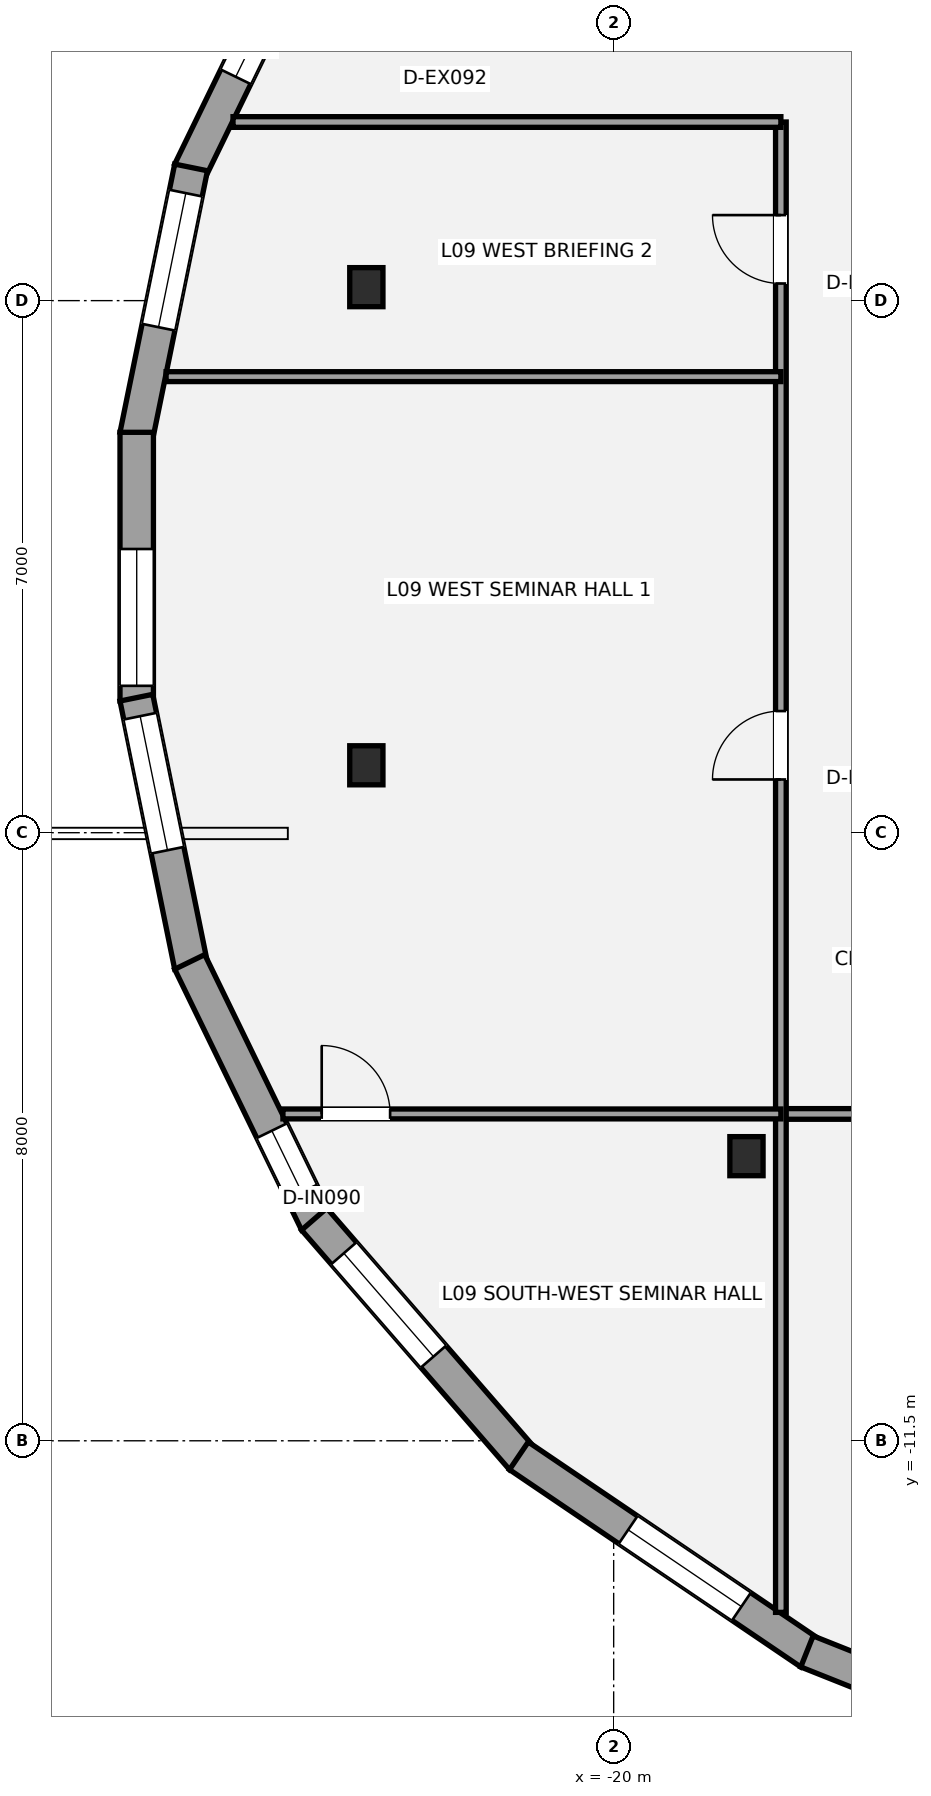
"""IFC4 building model, lengths in metres.
Left out: names, types, materials, properties, quantities, classifications, styles, units other than length and angle.
Written with IfcOpenShell. Run it as: python <this file> out.ifc"""

import sys

from ifc_helpers import new_model, si_unit, direction, frame, frame_2d, origin, origin_2d, place, context, subcontext, project, spatial, rectangle, i_section, extrude, element, fill, save


model = new_model("IFC4")
c1 = context("Model", 3, precision=1e-05, world=origin(), true_north=direction((0.0, 1.0)))
c2 = subcontext(c1, "Body", "Model", "MODEL_VIEW")
j1 = project(units=[si_unit("LENGTHUNIT", "METRE"), si_unit("PLANEANGLEUNIT", "RADIAN")], contexts=[c1])
p1 = place(None, origin())
s1 = spatial("IfcSite", under=j1, at=p1, CompositionType="ELEMENT")
p2 = place(p1, origin())
s2 = spatial("IfcBuilding", under=s1, at=p2, CompositionType="ELEMENT")
p3 = place(p2, frame((0.0, 0.0, 37.8)))
s3 = spatial("IfcBuildingStorey", under=s2, at=p3, CompositionType="ELEMENT", Elevation=37.8)
for number, where, z_axis, x_axis in (
    (1, (-23.254, 3.677, 0.0), (0.0, 0.0, 1.0), (1.0, 0.0, 0.0)),
    (2, (-23.254, -2.613, 0.0), (0.0, 0.0, 1.0), (1.0, 0.0, 0.0)),
    (3, (-18.253, -7.756, 0.0), (0.0, 0.0, 1.0), (1.0, 0.0, 0.0)),
):
    element("IfcColumn", number, at=place(p3, frame(where, z_axis=z_axis, x_axis=x_axis)), inside=s3, PredefinedType="COLUMN", context=c2, shape_type="SweptSolid", body=[
        extrude(i_section(OverallWidth=0.437, OverallDepth=0.514, WebThickness=0.061, FlangeThickness=0.097, at=origin_2d()), origin(), (0.0, 0.0, 1.0), 3.6),
    ])
p4 = place(p3, frame((-25.578, 5.2, 0.0), z_axis=(0.0, 0.0, 1.0), x_axis=(0.437488090563, 0.899224204865, 0.0)))
e4 = element("IfcWall", 4, at=p4, inside=s3, PredefinedType="STANDARD", context=c2, shape_type="SweptSolid", body=[
    extrude(rectangle(XDim=3.816, YDim=0.44, at=frame_2d((1.908, 0.0))), origin(), (0.0, 0.0, 1.0), 2.533),
])
p5 = place(p4, frame((1.384, 0.0, 0.58)))
e5 = element("IfcOpeningElement", 5, at=p5, cuts=e4, PredefinedType="OPENING", context=c2, shape_type="SweptSolid", body=[
    extrude(rectangle(XDim=0.9, YDim=1.35, at=frame_2d((0.45, 0.675))), frame((0.0, 0.23, 0.0), z_axis=(0.0, -1.0, 0.0), x_axis=(1.0, 0.0, 0.0)), (0.0, 0.0, 1.0), 0.46),
])
p6 = place(p3, frame((-26.28, 1.724, 0.0), z_axis=(0.0, 0.0, 1.0), x_axis=(0.199856409009, 0.979825196542, 0.0)))
e6 = element("IfcWall", 6, at=p6, inside=s3, PredefinedType="STANDARD", context=c2, shape_type="SweptSolid", body=[
    extrude(rectangle(XDim=3.601, YDim=0.44, at=frame_2d((1.801, 0.0))), origin(), (0.0, 0.0, 1.0), 2.533),
])
p7 = place(p6, frame((1.456, 0.0, 0.65)))
e7 = element("IfcOpeningElement", 7, at=p7, cuts=e6, PredefinedType="OPENING", context=c2, shape_type="SweptSolid", body=[
    extrude(rectangle(XDim=1.8, YDim=1.7, at=frame_2d((0.9, 0.85))), frame((0.0, 0.23, 0.0), z_axis=(0.0, -1.0, 0.0), x_axis=(1.0, 0.0, 0.0)), (0.0, 0.0, 1.0), 0.46),
])
p8 = place(p3, frame((-26.275, -1.768, 0.0), z_axis=(0.0, 0.0, 1.0), x_axis=(0.0, 1.0, 0.0)))
e8 = element("IfcWall", 8, at=p8, inside=s3, PredefinedType="STANDARD", context=c2, shape_type="SweptSolid", body=[
    extrude(rectangle(XDim=3.535, YDim=0.44, at=frame_2d((1.768, 0.0))), origin(), (0.0, 0.0, 1.0), 2.533),
])
p9 = place(p8, frame((0.2, 0.0, 0.65)))
e9 = element("IfcOpeningElement", 9, at=p9, cuts=e8, PredefinedType="OPENING", context=c2, shape_type="SweptSolid", body=[
    extrude(rectangle(XDim=1.8, YDim=1.7, at=frame_2d((0.9, 0.85))), frame((0.0, 0.23, 0.0), z_axis=(0.0, -1.0, 0.0), x_axis=(1.0, 0.0, 0.0)), (0.0, 0.0, 1.0), 0.46),
])
p10 = place(p3, frame((-25.56, -5.252, 0.0), z_axis=(0.0, 0.0, 1.0), x_axis=(-0.199856409009, 0.979825196542, 0.0)))
e10 = element("IfcWall", 10, at=p10, inside=s3, PredefinedType="STANDARD", context=c2, shape_type="SweptSolid", body=[
    extrude(rectangle(XDim=3.601, YDim=0.44, at=frame_2d((1.801, 0.0))), origin(), (0.0, 0.0, 1.0), 2.533),
])
p11 = place(p10, frame((1.553, 0.0, 0.65)))
e11 = element("IfcOpeningElement", 11, at=p11, cuts=e10, PredefinedType="OPENING", context=c2, shape_type="SweptSolid", body=[
    extrude(rectangle(XDim=1.8, YDim=1.7, at=frame_2d((0.9, 0.85))), frame((0.0, 0.23, 0.0), z_axis=(0.0, -1.0, 0.0), x_axis=(1.0, 0.0, 0.0)), (0.0, 0.0, 1.0), 0.46),
])
p12 = place(p3, frame((-23.908, -8.632, 0.0), z_axis=(0.0, 0.0, 1.0), x_axis=(-0.437488090563, 0.899224204865, 0.0)))
e12 = element("IfcWall", 12, at=p12, inside=s3, PredefinedType="STANDARD", context=c2, shape_type="SweptSolid", body=[
    extrude(rectangle(XDim=3.816, YDim=0.44, at=frame_2d((1.908, 0.0))), origin(), (0.0, 0.0, 1.0), 2.533),
])
p13 = place(p12, frame((0.447, 0.0, 0.58)))
e13 = element("IfcOpeningElement", 13, at=p13, cuts=e12, PredefinedType="OPENING", context=c2, shape_type="SweptSolid", body=[
    extrude(rectangle(XDim=0.9, YDim=1.35, at=frame_2d((0.45, 0.675))), frame((0.0, 0.23, 0.0), z_axis=(0.0, -1.0, 0.0), x_axis=(1.0, 0.0, 0.0)), (0.0, 0.0, 1.0), 0.46),
])
p14 = place(p3, frame((-21.204, -11.736, 0.0), z_axis=(0.0, 0.0, 1.0), x_axis=(-0.655509370307, 0.755187040037, 0.0)))
e14 = element("IfcWall", 14, at=p14, inside=s3, PredefinedType="STANDARD", context=c2, shape_type="SweptSolid", body=[
    extrude(rectangle(XDim=4.174, YDim=0.44, at=frame_2d((2.087, 0.0))), origin(), (0.0, 0.0, 1.0), 2.533),
])
p15 = place(p14, frame((1.779, 0.0, 0.65)))
e15 = element("IfcOpeningElement", 15, at=p15, cuts=e14, PredefinedType="OPENING", context=c2, shape_type="SweptSolid", body=[
    extrude(rectangle(XDim=1.8, YDim=1.7, at=frame_2d((0.9, 0.85))), frame((0.0, 0.23, 0.0), z_axis=(0.0, -1.0, 0.0), x_axis=(1.0, 0.0, 0.0)), (0.0, 0.0, 1.0), 0.46),
])
p16 = place(p3, frame((-17.415, -14.294, 0.0), z_axis=(0.0, 0.0, 1.0), x_axis=(-0.827913159939, 0.560856309227, 0.0)))
e16 = element("IfcWall", 16, at=p16, inside=s3, PredefinedType="STANDARD", context=c2, shape_type="SweptSolid", body=[
    extrude(rectangle(XDim=4.629, YDim=0.44, at=frame_2d((2.314, 0.0))), origin(), (0.0, 0.0, 1.0), 2.533),
])
p17 = place(p16, frame((1.092, 0.0, 0.65)))
e17 = element("IfcOpeningElement", 17, at=p17, cuts=e16, PredefinedType="OPENING", context=c2, shape_type="SweptSolid", body=[
    extrude(rectangle(XDim=1.8, YDim=1.7, at=frame_2d((0.9, 0.85))), frame((0.0, 0.23, 0.0), z_axis=(0.0, -1.0, 0.0), x_axis=(1.0, 0.0, 0.0)), (0.0, 0.0, 1.0), 0.46),
])
p18 = place(p3, frame((-12.804, -16.125, 0.0), z_axis=(0.0, 0.0, 1.0), x_axis=(-0.929030310441, 0.370003624688, 0.0)))
e18 = element("IfcWall", 18, at=p18, inside=s3, PredefinedType="STANDARD", context=c2, shape_type="SweptSolid", body=[
    extrude(rectangle(XDim=5.009, YDim=0.44, at=frame_2d((2.504, 0.0))), origin(), (0.0, 0.0, 1.0), 2.533),
])
p19 = place(p18, frame((2.023, 0.0, 0.65)))
e19 = element("IfcOpeningElement", 19, at=p19, cuts=e18, PredefinedType="OPENING", context=c2, shape_type="SweptSolid", body=[
    extrude(rectangle(XDim=1.8, YDim=1.7, at=frame_2d((0.9, 0.85))), frame((0.0, 0.23, 0.0), z_axis=(0.0, -1.0, 0.0), x_axis=(1.0, 0.0, 0.0)), (0.0, 0.0, 1.0), 0.46),
])
p20 = place(p3, frame((-17.8, -7.2, 0.0), z_axis=(0.0, 0.0, 1.0), x_axis=(1.0, 0.0, 0.0)))
e20 = element("IfcWall", 20, at=p20, inside=s3, PredefinedType="PARTITIONING", context=c2, shape_type="SweptSolid", body=[
    extrude(rectangle(XDim=33.9, YDim=0.14, at=frame_2d((16.95, 0.0))), origin(), (0.0, 0.0, 1.0), 2.853),
])
p21 = place(p20, frame((5.65, 0.0, 0.0)))
e21 = element("IfcOpeningElement", 21, at=p21, cuts=e20, PredefinedType="OPENING", context=c2, shape_type="SweptSolid", body=[
    extrude(rectangle(XDim=1.5, YDim=2.15, at=frame_2d((0.75, 1.075))), frame((0.0, 0.08, 0.0), z_axis=(0.0, -1.0, 0.0), x_axis=(1.0, 0.0, 0.0)), (0.0, 0.0, 1.0), 0.16),
])
p22 = place(p20, frame((17.05, 0.0, 0.0)))
e22 = element("IfcOpeningElement", 22, at=p22, cuts=e20, PredefinedType="OPENING", context=c2, shape_type="SweptSolid", body=[
    extrude(rectangle(XDim=1.5, YDim=2.15, at=frame_2d((0.75, 1.075))), frame((0.0, 0.08, 0.0), z_axis=(0.0, -1.0, 0.0), x_axis=(1.0, 0.0, 0.0)), (0.0, 0.0, 1.0), 0.16),
])
p23 = place(p20, frame((27.6, 0.0, 0.0)))
e23 = element("IfcOpeningElement", 23, at=p23, cuts=e20, PredefinedType="OPENING", context=c2, shape_type="SweptSolid", body=[
    extrude(rectangle(XDim=1.5, YDim=2.15, at=frame_2d((0.75, 1.075))), frame((0.0, 0.08, 0.0), z_axis=(0.0, -1.0, 0.0), x_axis=(1.0, 0.0, 0.0)), (0.0, 0.0, 1.0), 0.16),
])
p24 = place(p3, frame((-17.8, -13.757, 0.0), z_axis=(0.0, 0.0, 1.0), x_axis=(0.0, 1.0, 0.0)))
e24 = element("IfcWall", 24, at=p24, inside=s3, PredefinedType="PARTITIONING", context=c2, shape_type="SweptSolid", body=[
    extrude(rectangle(XDim=19.607, YDim=0.14, at=frame_2d((9.804, 0.0))), origin(), (0.0, 0.0, 1.0), 2.841),
])
p25 = place(p24, frame((10.958, 0.0, 0.0)))
e25 = element("IfcOpeningElement", 25, at=p25, cuts=e24, PredefinedType="OPENING", context=c2, shape_type="SweptSolid", body=[
    extrude(rectangle(XDim=0.9, YDim=2.1, at=frame_2d((0.45, 1.05))), frame((0.0, 0.08, 0.0), z_axis=(0.0, -1.0, 0.0), x_axis=(1.0, 0.0, 0.0)), (0.0, 0.0, 1.0), 0.16),
])
p26 = place(p24, frame((17.483, 0.0, 0.0)))
e26 = element("IfcOpeningElement", 26, at=p26, cuts=e24, PredefinedType="OPENING", context=c2, shape_type="SweptSolid", body=[
    extrude(rectangle(XDim=0.9, YDim=2.1, at=frame_2d((0.45, 1.05))), frame((0.0, 0.08, 0.0), z_axis=(0.0, -1.0, 0.0), x_axis=(1.0, 0.0, 0.0)), (0.0, 0.0, 1.0), 0.16),
])
p27 = place(p3, frame((-25.008, 5.85, 0.0), z_axis=(0.0, 0.0, 1.0), x_axis=(1.0, 0.0, 0.0)))
e27 = element("IfcWall", 27, at=p27, inside=s3, PredefinedType="PARTITIONING", context=c2, shape_type="SweptSolid", body=[
    extrude(rectangle(XDim=7.208, YDim=0.14, at=frame_2d((3.604, 0.0))), origin(), (0.0, 0.0, 1.0), 2.853),
])
p28 = place(p3, frame((-24.351, -7.2, 0.0), z_axis=(0.0, 0.0, 1.0), x_axis=(1.0, 0.0, 0.0)))
e28 = element("IfcWall", 28, at=p28, inside=s3, PredefinedType="PARTITIONING", context=c2, shape_type="SweptSolid", body=[
    extrude(rectangle(XDim=6.551, YDim=0.13, at=frame_2d((3.276, 0.0))), origin(), (0.0, 0.0, 1.0), 2.779),
])
p29 = place(p28, frame((0.51, 0.0, 0.0)))
e29 = element("IfcOpeningElement", 29, at=p29, cuts=e28, PredefinedType="OPENING", context=c2, shape_type="SweptSolid", body=[
    extrude(rectangle(XDim=0.9, YDim=2.1, at=frame_2d((0.45, 1.05))), frame((0.0, 0.075, 0.0), z_axis=(0.0, -1.0, 0.0), x_axis=(1.0, 0.0, 0.0)), (0.0, 0.0, 1.0), 0.15),
])
p30 = place(p3, frame((-25.889, 2.5, 0.0), z_axis=(0.0, 0.0, 1.0), x_axis=(1.0, 0.0, 0.0)))
e30 = element("IfcWall", 30, at=p30, inside=s3, PredefinedType="PARTITIONING", context=c2, shape_type="SweptSolid", body=[
    extrude(rectangle(XDim=8.089, YDim=0.13, at=frame_2d((4.044, 0.0))), origin(), (0.0, 0.0, 1.0), 2.841),
])
p31 = place(p5, origin())
e31 = element("IfcWindow", 31, at=p31, inside=s3, PartitioningType="SINGLE_PANEL", PredefinedType="WINDOW", context=c2, shape_type="SweptSolid", body=[
    extrude(rectangle(XDim=0.9, YDim=1.35, at=frame_2d((0.45, 0.675))), frame((0.0, -0.01, 0.0), z_axis=(0.0, -1.0, 0.0), x_axis=(1.0, 0.0, 0.0)), (0.0, 0.0, 1.0), 0.06),
])
fill(e5, e31)
p32 = place(p7, origin())
e32 = element("IfcWindow", 32, at=p32, inside=s3, PartitioningType="SINGLE_PANEL", PredefinedType="WINDOW", context=c2, shape_type="SweptSolid", body=[
    extrude(rectangle(XDim=1.8, YDim=1.7, at=frame_2d((0.9, 0.85))), frame((0.0, -0.01, 0.0), z_axis=(0.0, -1.0, 0.0), x_axis=(1.0, 0.0, 0.0)), (0.0, 0.0, 1.0), 0.06),
])
fill(e7, e32)
p33 = place(p9, origin())
e33 = element("IfcWindow", 33, at=p33, inside=s3, PartitioningType="SINGLE_PANEL", PredefinedType="WINDOW", context=c2, shape_type="SweptSolid", body=[
    extrude(rectangle(XDim=1.8, YDim=1.7, at=frame_2d((0.9, 0.85))), frame((0.0, -0.01, 0.0), z_axis=(0.0, -1.0, 0.0), x_axis=(1.0, 0.0, 0.0)), (0.0, 0.0, 1.0), 0.06),
])
fill(e9, e33)
p34 = place(p11, origin())
e34 = element("IfcWindow", 34, at=p34, inside=s3, PartitioningType="SINGLE_PANEL", PredefinedType="WINDOW", context=c2, shape_type="SweptSolid", body=[
    extrude(rectangle(XDim=1.8, YDim=1.7, at=frame_2d((0.9, 0.85))), frame((0.0, -0.01, 0.0), z_axis=(0.0, -1.0, 0.0), x_axis=(1.0, 0.0, 0.0)), (0.0, 0.0, 1.0), 0.06),
])
fill(e11, e34)
p35 = place(p13, origin())
e35 = element("IfcWindow", 35, at=p35, inside=s3, PartitioningType="SINGLE_PANEL", PredefinedType="WINDOW", context=c2, shape_type="SweptSolid", body=[
    extrude(rectangle(XDim=0.9, YDim=1.35, at=frame_2d((0.45, 0.675))), frame((0.0, -0.01, 0.0), z_axis=(0.0, -1.0, 0.0), x_axis=(1.0, 0.0, 0.0)), (0.0, 0.0, 1.0), 0.06),
])
fill(e13, e35)
p36 = place(p15, origin())
e36 = element("IfcWindow", 36, at=p36, inside=s3, PartitioningType="SINGLE_PANEL", PredefinedType="WINDOW", context=c2, shape_type="SweptSolid", body=[
    extrude(rectangle(XDim=1.8, YDim=1.7, at=frame_2d((0.9, 0.85))), frame((0.0, -0.01, 0.0), z_axis=(0.0, -1.0, 0.0), x_axis=(1.0, 0.0, 0.0)), (0.0, 0.0, 1.0), 0.06),
])
fill(e15, e36)
p37 = place(p17, origin())
e37 = element("IfcWindow", 37, at=p37, inside=s3, PartitioningType="SINGLE_PANEL", PredefinedType="WINDOW", context=c2, shape_type="SweptSolid", body=[
    extrude(rectangle(XDim=1.8, YDim=1.7, at=frame_2d((0.9, 0.85))), frame((0.0, -0.01, 0.0), z_axis=(0.0, -1.0, 0.0), x_axis=(1.0, 0.0, 0.0)), (0.0, 0.0, 1.0), 0.06),
])
fill(e17, e37)
p38 = place(p29, origin())
e38 = element("IfcDoor", 38, at=p38, inside=s3, OperationType="SINGLE_SWING_LEFT", PredefinedType="DOOR", context=c2, shape_type="SweptSolid", body=[
    extrude(rectangle(XDim=0.9, YDim=2.1, at=frame_2d((0.45, 1.05))), frame((0.0, 0.025, 0.0), z_axis=(0.0, -1.0, 0.0), x_axis=(1.0, 0.0, 0.0)), (0.0, 0.0, 1.0), 0.05),
])
fill(e29, e38)
p39 = place(p25, origin())
e39 = element("IfcDoor", 39, at=p39, inside=s3, OperationType="SINGLE_SWING_LEFT", PredefinedType="DOOR", context=c2, shape_type="SweptSolid", body=[
    extrude(rectangle(XDim=0.9, YDim=2.1, at=frame_2d((0.45, 1.05))), frame((0.0, 0.025, 0.0), z_axis=(0.0, -1.0, 0.0), x_axis=(1.0, 0.0, 0.0)), (0.0, 0.0, 1.0), 0.05),
])
fill(e25, e39)
p40 = place(p26, origin())
e40 = element("IfcDoor", 40, at=p40, inside=s3, OperationType="SINGLE_SWING_RIGHT", PredefinedType="DOOR", context=c2, shape_type="SweptSolid", body=[
    extrude(rectangle(XDim=0.9, YDim=2.1, at=frame_2d((0.45, 1.05))), frame((0.0, 0.025, 0.0), z_axis=(0.0, -1.0, 0.0), x_axis=(1.0, 0.0, 0.0)), (0.0, 0.0, 1.0), 0.05),
])
fill(e26, e40)
save(model, sys.argv[1])
